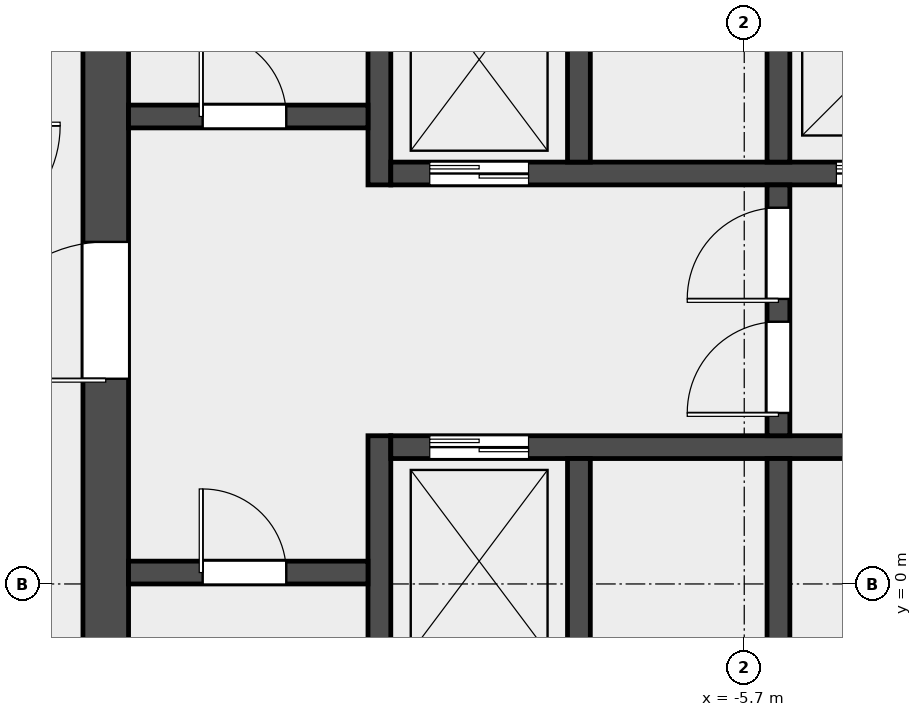
"""IFC4 building model, lengths in metres.
Left out: names, types, materials, properties, quantities, classifications, styles, units other than length and angle.
Written with IfcOpenShell. Run it as: python <this file> out.ifc"""

import sys

from ifc_helpers import new_model, si_unit, direction, frame, frame_2d, origin, place, context, subcontext, project, spatial, rectangle, extrude, element, fill, save


model = new_model("IFC4")
c1 = context("Model", 3, precision=1e-05, world=origin(), true_north=direction((0.0, 1.0)))
c2 = subcontext(c1, "Body", "Model", "MODEL_VIEW")
j1 = project(units=[si_unit("LENGTHUNIT", "METRE"), si_unit("PLANEANGLEUNIT", "RADIAN")], contexts=[c1])
p1 = place(None, origin())
s1 = spatial("IfcSite", under=j1, at=p1, CompositionType="ELEMENT")
p2 = place(p1, origin())
s2 = spatial("IfcBuilding", under=s1, at=p2, CompositionType="ELEMENT")
p3 = place(p2, frame((0.0, 0.0, 231.0)))
s3 = spatial("IfcBuildingStorey", under=s2, at=p3, CompositionType="ELEMENT", Elevation=231.0)
p4 = place(p3, frame((-14.1, -6.6, 0.0), z_axis=(0.0, 0.0, 1.0), x_axis=(0.0, 1.0, 0.0)))
e1 = element("IfcWall", 1, at=p4, inside=s3, PredefinedType="SHEAR", context=c2, shape_type="SweptSolid", body=[
    extrude(rectangle(XDim=19.5, YDim=0.6, at=frame_2d((9.75, 0.0))), origin(), (0.0, 0.0, 1.0), 3.7),
])
p5 = place(p4, frame((9.3, 0.0, 0.0)))
e2 = element("IfcOpeningElement", 2, at=p5, cuts=e1, PredefinedType="OPENING", context=c2, shape_type="SweptSolid", body=[
    extrude(rectangle(XDim=1.8, YDim=2.1, at=frame_2d((0.9, 1.05))), frame((0.0, 0.312, 0.0), z_axis=(0.0, -1.0, 0.0), x_axis=(1.0, 0.0, 0.0)), (0.0, 0.0, 1.0), 0.624),
])
p6 = place(p3, frame((-10.5, -6.6, 0.0), z_axis=(0.0, 0.0, 1.0), x_axis=(0.0, 1.0, 0.0)))
e3 = element("IfcWall", 3, at=p6, inside=s3, PredefinedType="SHEAR", context=c2, shape_type="SweptSolid", body=[
    extrude(rectangle(XDim=8.55, YDim=0.3, at=frame_2d((4.275, 0.0))), origin(), (0.0, 0.0, 1.0), 3.7),
])
p7 = place(p3, frame((-10.5, 5.25, 0.0), z_axis=(0.0, 0.0, 1.0), x_axis=(0.0, 1.0, 0.0)))
e4 = element("IfcWall", 4, at=p7, inside=s3, PredefinedType="SHEAR", context=c2, shape_type="SweptSolid", body=[
    extrude(rectangle(XDim=7.65, YDim=0.3, at=frame_2d((3.825, 0.0))), origin(), (0.0, 0.0, 1.0), 3.7),
])
p8 = place(p3, frame((-13.8, 0.15, 0.0), z_axis=(0.0, 0.0, 1.0), x_axis=(1.0, 0.0, 0.0)))
e5 = element("IfcWall", 5, at=p8, inside=s3, PredefinedType="SOLIDWALL", context=c2, shape_type="SweptSolid", body=[
    extrude(rectangle(XDim=3.15, YDim=0.3, at=frame_2d((1.575, 0.0))), origin(), (0.0, 0.0, 1.0), 3.7),
])
p9 = place(p8, frame((0.975, 0.0, 0.0)))
e6 = element("IfcOpeningElement", 6, at=p9, cuts=e5, PredefinedType="OPENING", context=c2, shape_type="SweptSolid", body=[
    extrude(rectangle(XDim=1.1, YDim=2.1, at=frame_2d((0.55, 1.05))), frame((0.0, 0.162, 0.0), z_axis=(0.0, -1.0, 0.0), x_axis=(1.0, 0.0, 0.0)), (0.0, 0.0, 1.0), 0.324),
])
p10 = place(p3, frame((-13.8, 6.15, 0.0), z_axis=(0.0, 0.0, 1.0), x_axis=(1.0, 0.0, 0.0)))
e7 = element("IfcWall", 7, at=p10, inside=s3, PredefinedType="SOLIDWALL", context=c2, shape_type="SweptSolid", body=[
    extrude(rectangle(XDim=3.15, YDim=0.3, at=frame_2d((1.575, 0.0))), origin(), (0.0, 0.0, 1.0), 3.7),
])
p11 = place(p10, frame((0.975, 0.0, 0.0)))
e8 = element("IfcOpeningElement", 8, at=p11, cuts=e7, PredefinedType="OPENING", context=c2, shape_type="SweptSolid", body=[
    extrude(rectangle(XDim=1.1, YDim=2.1, at=frame_2d((0.55, 1.05))), frame((0.0, 0.162, 0.0), z_axis=(0.0, -1.0, 0.0), x_axis=(1.0, 0.0, 0.0)), (0.0, 0.0, 1.0), 0.324),
])
p12 = place(p3, frame((-10.35, 1.8, 0.0), z_axis=(0.0, 0.0, 1.0), x_axis=(1.0, 0.0, 0.0)))
e9 = element("IfcWall", 9, at=p12, inside=s3, PredefinedType="SOLIDWALL", context=c2, shape_type="SweptSolid", body=[
    extrude(rectangle(XDim=20.7, YDim=0.3, at=frame_2d((10.35, 0.0))), origin(), (0.0, 0.0, 1.0), 3.7),
])
p13 = place(p12, frame((0.512, 0.0, 0.0)))
e10 = element("IfcOpeningElement", 10, at=p13, cuts=e9, PredefinedType="OPENING", context=c2, shape_type="SweptSolid", body=[
    extrude(rectangle(XDim=1.3, YDim=2.1, at=frame_2d((0.65, 1.05))), frame((0.0, 0.162, 0.0), z_axis=(0.0, -1.0, 0.0), x_axis=(1.0, 0.0, 0.0)), (0.0, 0.0, 1.0), 0.324),
])
p14 = place(p12, frame((9.85, 0.0, 0.0)))
e11 = element("IfcOpeningElement", 11, at=p14, cuts=e9, PredefinedType="OPENING", context=c2, shape_type="SweptSolid", body=[
    extrude(rectangle(XDim=1.0, YDim=2.1, at=frame_2d((0.5, 1.05))), frame((0.0, 0.162, 0.0), z_axis=(0.0, -1.0, 0.0), x_axis=(1.0, 0.0, 0.0)), (0.0, 0.0, 1.0), 0.324),
])
p15 = place(p12, frame((16.413, 0.0, 0.0)))
e12 = element("IfcOpeningElement", 12, at=p15, cuts=e9, PredefinedType="OPENING", context=c2, shape_type="SweptSolid", body=[
    extrude(rectangle(XDim=1.0, YDim=2.1, at=frame_2d((0.5, 1.05))), frame((0.0, 0.162, 0.0), z_axis=(0.0, -1.0, 0.0), x_axis=(1.0, 0.0, 0.0)), (0.0, 0.0, 1.0), 0.324),
])
p16 = place(p12, frame((19.038, 0.0, 0.0)))
e13 = element("IfcOpeningElement", 13, at=p16, cuts=e9, PredefinedType="OPENING", context=c2, shape_type="SweptSolid", body=[
    extrude(rectangle(XDim=1.0, YDim=2.1, at=frame_2d((0.5, 1.05))), frame((0.0, 0.162, 0.0), z_axis=(0.0, -1.0, 0.0), x_axis=(1.0, 0.0, 0.0)), (0.0, 0.0, 1.0), 0.324),
])
p17 = place(p3, frame((-10.35, 5.4, 0.0), z_axis=(0.0, 0.0, 1.0), x_axis=(1.0, 0.0, 0.0)))
e14 = element("IfcWall", 14, at=p17, inside=s3, PredefinedType="SOLIDWALL", context=c2, shape_type="SweptSolid", body=[
    extrude(rectangle(XDim=20.7, YDim=0.3, at=frame_2d((10.35, 0.0))), origin(), (0.0, 0.0, 1.0), 3.7),
])
p18 = place(p17, frame((0.512, 0.0, 0.0)))
e15 = element("IfcOpeningElement", 15, at=p18, cuts=e14, PredefinedType="OPENING", context=c2, shape_type="SweptSolid", body=[
    extrude(rectangle(XDim=1.3, YDim=2.1, at=frame_2d((0.65, 1.05))), frame((0.0, 0.162, 0.0), z_axis=(0.0, -1.0, 0.0), x_axis=(1.0, 0.0, 0.0)), (0.0, 0.0, 1.0), 0.324),
])
p19 = place(p17, frame((5.863, 0.0, 0.0)))
e16 = element("IfcOpeningElement", 16, at=p19, cuts=e14, PredefinedType="OPENING", context=c2, shape_type="SweptSolid", body=[
    extrude(rectangle(XDim=1.1, YDim=2.1, at=frame_2d((0.55, 1.05))), frame((0.0, 0.162, 0.0), z_axis=(0.0, -1.0, 0.0), x_axis=(1.0, 0.0, 0.0)), (0.0, 0.0, 1.0), 0.324),
])
p20 = place(p17, frame((8.488, 0.0, 0.0)))
e17 = element("IfcOpeningElement", 17, at=p20, cuts=e14, PredefinedType="OPENING", context=c2, shape_type="SweptSolid", body=[
    extrude(rectangle(XDim=1.1, YDim=2.1, at=frame_2d((0.55, 1.05))), frame((0.0, 0.162, 0.0), z_axis=(0.0, -1.0, 0.0), x_axis=(1.0, 0.0, 0.0)), (0.0, 0.0, 1.0), 0.324),
])
p21 = place(p17, frame((11.113, 0.0, 0.0)))
e18 = element("IfcOpeningElement", 18, at=p21, cuts=e14, PredefinedType="OPENING", context=c2, shape_type="SweptSolid", body=[
    extrude(rectangle(XDim=1.1, YDim=2.1, at=frame_2d((0.55, 1.05))), frame((0.0, 0.162, 0.0), z_axis=(0.0, -1.0, 0.0), x_axis=(1.0, 0.0, 0.0)), (0.0, 0.0, 1.0), 0.324),
])
p22 = place(p17, frame((13.738, 0.0, 0.0)))
e19 = element("IfcOpeningElement", 19, at=p22, cuts=e14, PredefinedType="OPENING", context=c2, shape_type="SweptSolid", body=[
    extrude(rectangle(XDim=1.1, YDim=2.1, at=frame_2d((0.55, 1.05))), frame((0.0, 0.162, 0.0), z_axis=(0.0, -1.0, 0.0), x_axis=(1.0, 0.0, 0.0)), (0.0, 0.0, 1.0), 0.324),
])
p23 = place(p17, frame((16.363, 0.0, 0.0)))
e20 = element("IfcOpeningElement", 20, at=p23, cuts=e14, PredefinedType="OPENING", context=c2, shape_type="SweptSolid", body=[
    extrude(rectangle(XDim=1.1, YDim=2.1, at=frame_2d((0.55, 1.05))), frame((0.0, 0.162, 0.0), z_axis=(0.0, -1.0, 0.0), x_axis=(1.0, 0.0, 0.0)), (0.0, 0.0, 1.0), 0.324),
])
p24 = place(p17, frame((18.988, 0.0, 0.0)))
e21 = element("IfcOpeningElement", 21, at=p24, cuts=e14, PredefinedType="OPENING", context=c2, shape_type="SweptSolid", body=[
    extrude(rectangle(XDim=1.1, YDim=2.1, at=frame_2d((0.55, 1.05))), frame((0.0, 0.162, 0.0), z_axis=(0.0, -1.0, 0.0), x_axis=(1.0, 0.0, 0.0)), (0.0, 0.0, 1.0), 0.324),
])
for number, where, z_axis, x_axis in (
    (22, (-7.875, -1.05, 0.0), (0.0, 0.0, 1.0), (0.0, 1.0, 0.0)),
    (23, (-5.25, -1.05, 0.0), (0.0, 0.0, 1.0), (0.0, 1.0, 0.0)),
    (24, (-7.875, 5.55, 0.0), (0.0, 0.0, 1.0), (0.0, 1.0, 0.0)),
    (25, (-5.25, 5.55, 0.0), (0.0, 0.0, 1.0), (0.0, 1.0, 0.0)),
):
    element("IfcWall", number, at=place(p3, frame(where, z_axis=z_axis, x_axis=x_axis)), inside=s3, PredefinedType="SOLIDWALL", context=c2, shape_type="SweptSolid", body=[
        extrude(rectangle(XDim=2.7, YDim=0.3, at=frame_2d((1.35, 0.0))), origin(), (0.0, 0.0, 1.0), 3.7),
    ])
p25 = place(p3, frame((-5.25, 1.95, 0.0), z_axis=(0.0, 0.0, 1.0), x_axis=(0.0, 1.0, 0.0)))
e26 = element("IfcWall", 26, at=p25, inside=s3, PredefinedType="SOLIDWALL", context=c2, shape_type="SweptSolid", body=[
    extrude(rectangle(XDim=3.3, YDim=0.3, at=frame_2d((1.65, 0.0))), origin(), (0.0, 0.0, 1.0), 3.7),
])
p26 = place(p25, frame((0.3, 0.0, 0.0)))
e27 = element("IfcOpeningElement", 27, at=p26, cuts=e26, PredefinedType="OPENING", context=c2, shape_type="SweptSolid", body=[
    extrude(rectangle(XDim=1.2, YDim=2.1, at=frame_2d((0.6, 1.05))), frame((0.0, 0.162, 0.0), z_axis=(0.0, -1.0, 0.0), x_axis=(1.0, 0.0, 0.0)), (0.0, 0.0, 1.0), 0.324),
])
p27 = place(p25, frame((1.8, 0.0, 0.0)))
e28 = element("IfcOpeningElement", 28, at=p27, cuts=e26, PredefinedType="OPENING", context=c2, shape_type="SweptSolid", body=[
    extrude(rectangle(XDim=1.2, YDim=2.1, at=frame_2d((0.6, 1.05))), frame((0.0, 0.162, 0.0), z_axis=(0.0, -1.0, 0.0), x_axis=(1.0, 0.0, 0.0)), (0.0, 0.0, 1.0), 0.324),
])
p28 = place(p9, origin())
e29 = element("IfcDoor", 29, at=p28, inside=s3, OperationType="SINGLE_SWING_LEFT", PredefinedType="DOOR", context=c2, shape_type="SweptSolid", body=[
    extrude(rectangle(XDim=1.1, YDim=2.1, at=frame_2d((0.55, 1.05))), frame((0.0, 0.025, 0.0), z_axis=(0.0, -1.0, 0.0), x_axis=(1.0, 0.0, 0.0)), (0.0, 0.0, 1.0), 0.05),
])
fill(e6, e29)
p29 = place(p11, origin())
e30 = element("IfcDoor", 30, at=p29, inside=s3, OperationType="SINGLE_SWING_LEFT", PredefinedType="DOOR", context=c2, shape_type="SweptSolid", body=[
    extrude(rectangle(XDim=1.1, YDim=2.1, at=frame_2d((0.55, 1.05))), frame((0.0, 0.025, 0.0), z_axis=(0.0, -1.0, 0.0), x_axis=(1.0, 0.0, 0.0)), (0.0, 0.0, 1.0), 0.05),
])
fill(e8, e30)
p30 = place(p5, origin())
e31 = element("IfcDoor", 31, at=p30, inside=s3, OperationType="DOUBLE_DOOR_SINGLE_SWING", PredefinedType="DOOR", context=c2, shape_type="SweptSolid", body=[
    extrude(rectangle(XDim=1.8, YDim=2.1, at=frame_2d((0.9, 1.05))), frame((0.0, 0.025, 0.0), z_axis=(0.0, -1.0, 0.0), x_axis=(1.0, 0.0, 0.0)), (0.0, 0.0, 1.0), 0.05),
])
fill(e2, e31)
p31 = place(p26, origin())
e32 = element("IfcDoor", 32, at=p31, inside=s3, OperationType="SINGLE_SWING_LEFT", PredefinedType="DOOR", context=c2, shape_type="SweptSolid", body=[
    extrude(rectangle(XDim=1.2, YDim=2.1, at=frame_2d((0.6, 1.05))), frame((0.0, 0.025, 0.0), z_axis=(0.0, -1.0, 0.0), x_axis=(1.0, 0.0, 0.0)), (0.0, 0.0, 1.0), 0.05),
])
fill(e27, e32)
p32 = place(p27, origin())
e33 = element("IfcDoor", 33, at=p32, inside=s3, OperationType="SINGLE_SWING_RIGHT", PredefinedType="DOOR", context=c2, shape_type="SweptSolid", body=[
    extrude(rectangle(XDim=1.2, YDim=2.1, at=frame_2d((0.6, 1.05))), frame((0.0, 0.025, 0.0), z_axis=(0.0, -1.0, 0.0), x_axis=(1.0, 0.0, 0.0)), (0.0, 0.0, 1.0), 0.05),
])
fill(e28, e33)
p33 = place(p13, origin())
e34 = element("IfcDoor", 34, at=p33, inside=s3, OperationType="DOUBLE_DOOR_SLIDING", PredefinedType="DOOR", context=c2, shape_type="SweptSolid", body=[
    extrude(rectangle(XDim=1.3, YDim=2.1, at=frame_2d((0.65, 1.05))), frame((0.0, 0.025, 0.0), z_axis=(0.0, -1.0, 0.0), x_axis=(1.0, 0.0, 0.0)), (0.0, 0.0, 1.0), 0.05),
])
fill(e10, e34)
p34 = place(p18, origin())
e35 = element("IfcDoor", 35, at=p34, inside=s3, OperationType="DOUBLE_DOOR_SLIDING", PredefinedType="DOOR", context=c2, shape_type="SweptSolid", body=[
    extrude(rectangle(XDim=1.3, YDim=2.1, at=frame_2d((0.65, 1.05))), frame((0.0, 0.025, 0.0), z_axis=(0.0, -1.0, 0.0), x_axis=(1.0, 0.0, 0.0)), (0.0, 0.0, 1.0), 0.05),
])
fill(e15, e35)
p35 = place(p19, origin())
e36 = element("IfcDoor", 36, at=p35, inside=s3, OperationType="DOUBLE_DOOR_SLIDING", PredefinedType="DOOR", context=c2, shape_type="SweptSolid", body=[
    extrude(rectangle(XDim=1.1, YDim=2.1, at=frame_2d((0.55, 1.05))), frame((0.0, 0.025, 0.0), z_axis=(0.0, -1.0, 0.0), x_axis=(1.0, 0.0, 0.0)), (0.0, 0.0, 1.0), 0.05),
])
fill(e16, e36)
save(model, sys.argv[1])
